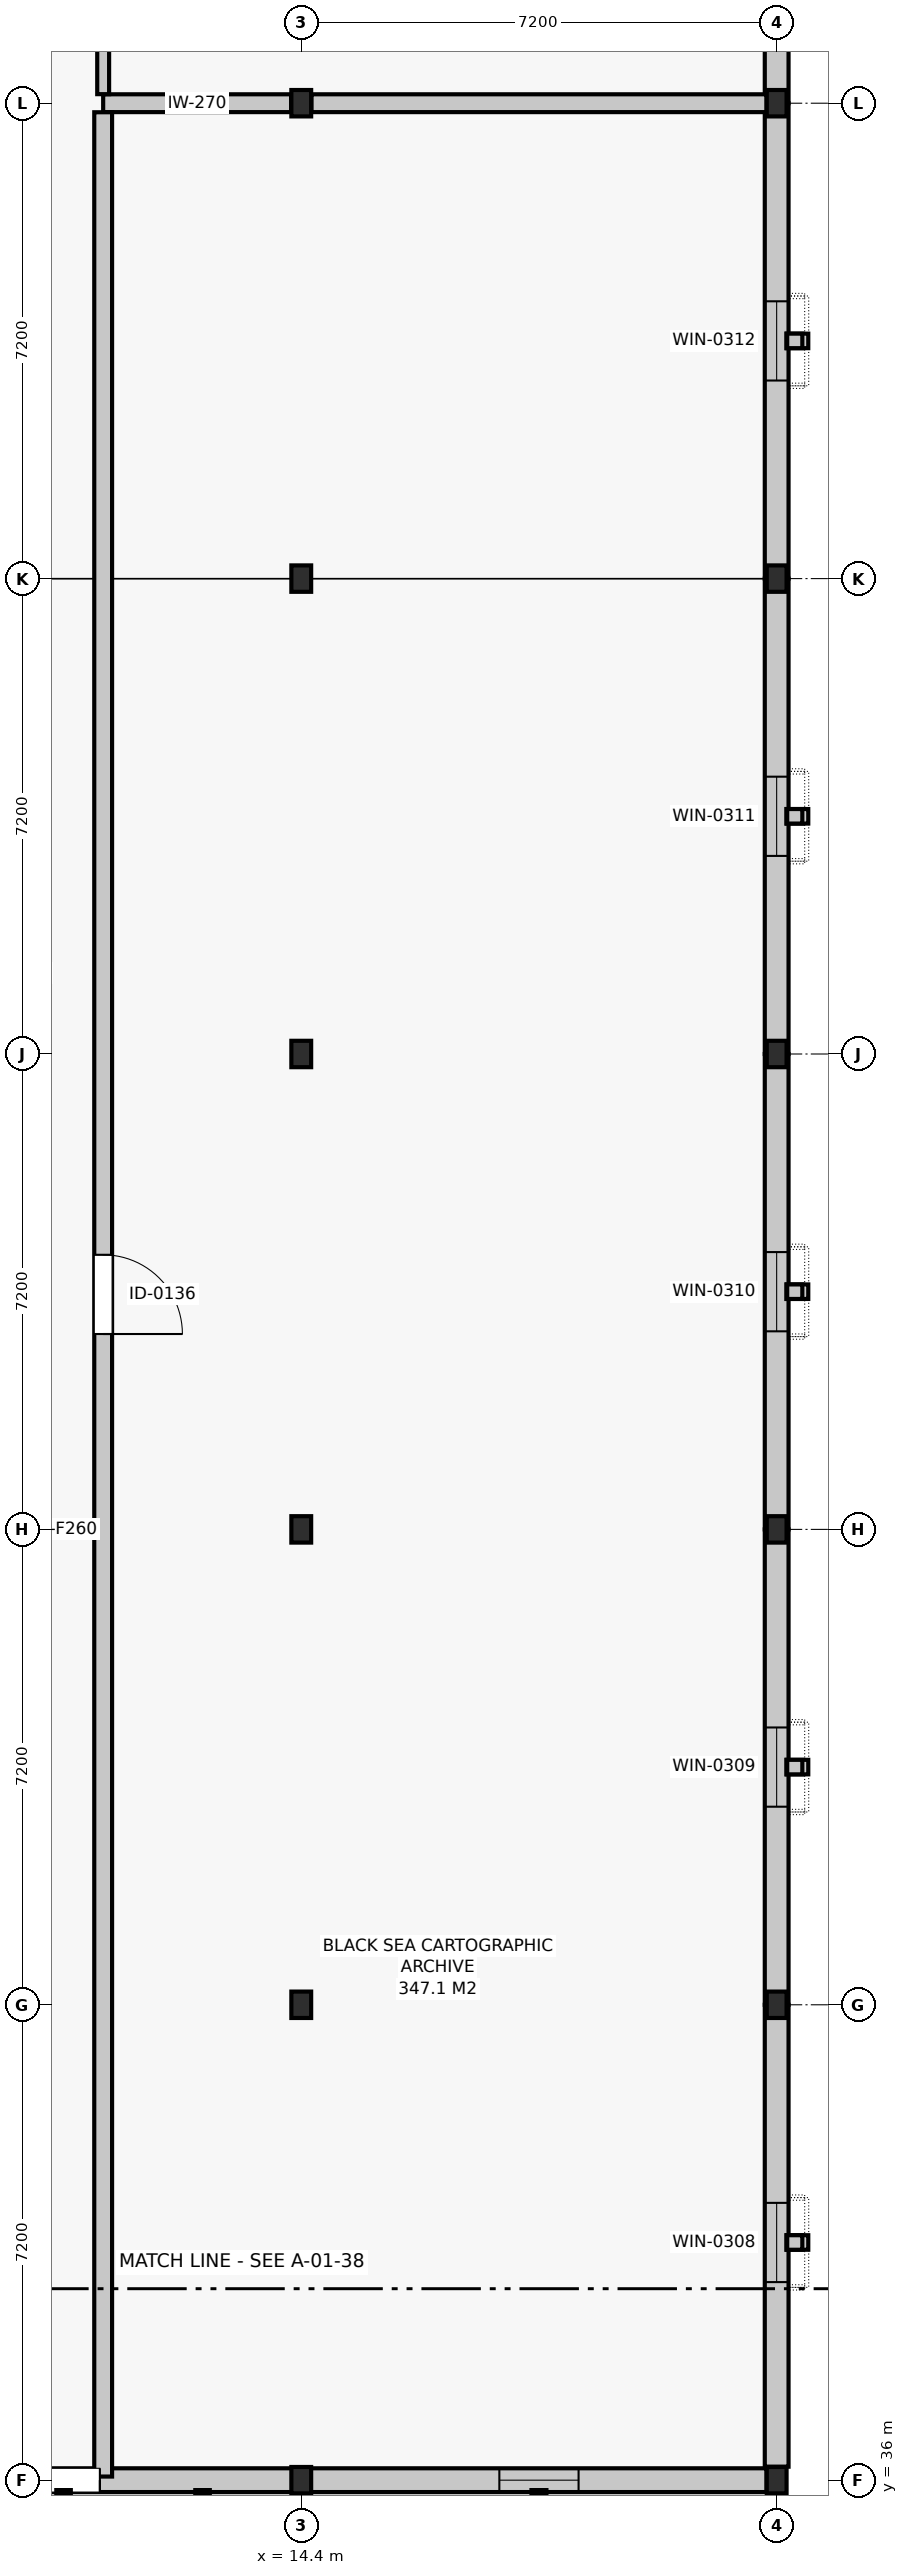
"""IFC4 building model, lengths in metres.
Left out: names, types, materials, properties, quantities, classifications, styles, units other than length and angle.
Written with IfcOpenShell. Run it as: python <this file> out.ifc"""

import sys

from ifc_helpers import new_model, si_unit, direction, frame, frame_2d, origin, origin_2d, place, context, subcontext, project, spatial, rectangle, i_section, extrude, element, fill, save


model = new_model("IFC4")
c1 = context("Model", 3, precision=1e-05, world=origin(), true_north=direction((0.0, 1.0)))
c2 = subcontext(c1, "Body", "Model", "MODEL_VIEW")
j1 = project(units=[si_unit("LENGTHUNIT", "METRE"), si_unit("PLANEANGLEUNIT", "RADIAN")], contexts=[c1])
p1 = place(None, origin())
s1 = spatial("IfcSite", under=j1, at=p1, CompositionType="ELEMENT")
p2 = place(p1, origin())
s2 = spatial("IfcBuilding", under=s1, at=p2, CompositionType="ELEMENT")
p3 = place(p2, frame((0.0, 0.0, 18.6)))
s3 = spatial("IfcBuildingStorey", under=s2, at=p3, CompositionType="ELEMENT", Elevation=18.6)
for number, where, z_axis, x_axis in (
    (1, (14.4, 36.0, 0.0), (0.0, 0.0, 1.0), (1.0, 0.0, 0.0)),
    (2, (14.4, 43.2, 0.0), (0.0, 0.0, 1.0), (1.0, 0.0, 0.0)),
    (3, (14.4, 50.4, 0.0), (0.0, 0.0, 1.0), (1.0, 0.0, 0.0)),
    (4, (14.4, 57.6, 0.0), (0.0, 0.0, 1.0), (1.0, 0.0, 0.0)),
    (5, (14.4, 64.8, 0.0), (0.0, 0.0, 1.0), (1.0, 0.0, 0.0)),
    (6, (14.4, 72.0, 0.0), (0.0, 0.0, 1.0), (1.0, 0.0, 0.0)),
    (7, (21.6, 36.0, 0.0), (0.0, 0.0, 1.0), (1.0, 0.0, 0.0)),
    (8, (21.6, 43.2, 0.0), (0.0, 0.0, 1.0), (1.0, 0.0, 0.0)),
    (9, (21.6, 50.4, 0.0), (0.0, 0.0, 1.0), (1.0, 0.0, 0.0)),
    (10, (21.6, 57.6, 0.0), (0.0, 0.0, 1.0), (1.0, 0.0, 0.0)),
    (11, (21.6, 64.8, 0.0), (0.0, 0.0, 1.0), (1.0, 0.0, 0.0)),
    (12, (21.6, 72.0, 0.0), (0.0, 0.0, 1.0), (1.0, 0.0, 0.0)),
):
    element("IfcColumn", number, at=place(p3, frame(where, z_axis=z_axis, x_axis=x_axis)), inside=s3, PredefinedType="COLUMN", context=c2, shape_type="SweptSolid", body=[
        extrude(i_section(OverallWidth=0.3, OverallDepth=0.4, WebThickness=0.013, FlangeThickness=0.024, FilletRadius=0.027, at=origin_2d()), origin(), (0.0, 0.0, 1.0), 4.2),
    ])
p4 = place(p3, frame((7.2, 36.0, 0.0), z_axis=(0.0, 0.0, 1.0), x_axis=(1.0, 0.0, 0.0)))
e13 = element("IfcWall", 13, at=p4, inside=s3, PredefinedType="SOLIDWALL", context=c2, shape_type="SweptSolid", body=[
    extrude(rectangle(XDim=7.2, YDim=0.36, at=frame_2d((3.6, 0.0))), origin(), (0.0, 0.0, 1.0), 3.22),
])
p5 = place(p4, frame((3.05, 0.0, 0.0)))
e14 = element("IfcOpeningElement", 14, at=p5, cuts=e13, PredefinedType="OPENING", context=c2, shape_type="SweptSolid", body=[
    extrude(rectangle(XDim=1.1, YDim=2.2, at=frame_2d((0.55, 1.1))), frame((0.0, 0.192, 0.0), z_axis=(0.0, -1.0, 0.0), x_axis=(1.0, 0.0, 0.0)), (0.0, 0.0, 1.0), 0.384),
])
p6 = place(p3, frame((14.4, 36.0, 0.0), z_axis=(0.0, 0.0, 1.0), x_axis=(1.0, 0.0, 0.0)))
e15 = element("IfcWall", 15, at=p6, inside=s3, PredefinedType="SOLIDWALL", context=c2, shape_type="SweptSolid", body=[
    extrude(rectangle(XDim=7.046, YDim=0.36, at=frame_2d((3.523, 0.0))), origin(), (0.0, 0.0, 1.0), 3.22),
])
p7 = place(p6, frame((3.0, 0.0, 0.95)))
e16 = element("IfcOpeningElement", 16, at=p7, cuts=e15, PredefinedType="OPENING", context=c2, shape_type="SweptSolid", body=[
    extrude(rectangle(XDim=1.2, YDim=2.15, at=frame_2d((0.6, 1.075))), frame((0.0, 0.192, 0.0), z_axis=(0.0, -1.0, 0.0), x_axis=(1.0, 0.0, 0.0)), (0.0, 0.0, 1.0), 0.384),
])
p8 = place(p3, frame((21.6, 36.204, 0.0), z_axis=(0.0, 0.0, 1.0), x_axis=(0.0, 1.0, 0.0)))
e17 = element("IfcWall", 17, at=p8, inside=s3, PredefinedType="SOLIDWALL", context=c2, shape_type="SweptSolid", body=[
    extrude(rectangle(XDim=6.996, YDim=0.36, at=frame_2d((3.498, 0.0))), origin(), (0.0, 0.0, 1.0), 3.22),
])
p9 = place(p8, frame((2.796, 0.0, 0.95)))
e18 = element("IfcOpeningElement", 18, at=p9, cuts=e17, PredefinedType="OPENING", context=c2, shape_type="SweptSolid", body=[
    extrude(rectangle(XDim=1.2, YDim=2.15, at=frame_2d((0.6, 1.075))), frame((0.0, 0.192, 0.0), z_axis=(0.0, -1.0, 0.0), x_axis=(1.0, 0.0, 0.0)), (0.0, 0.0, 1.0), 0.384),
])
p10 = place(p3, frame((21.6, 43.2, 0.0), z_axis=(0.0, 0.0, 1.0), x_axis=(0.0, 1.0, 0.0)))
e19 = element("IfcWall", 19, at=p10, inside=s3, PredefinedType="SOLIDWALL", context=c2, shape_type="SweptSolid", body=[
    extrude(rectangle(XDim=7.2, YDim=0.36, at=frame_2d((3.6, 0.0))), origin(), (0.0, 0.0, 1.0), 3.22),
])
p11 = place(p10, frame((3.0, 0.0, 0.95)))
e20 = element("IfcOpeningElement", 20, at=p11, cuts=e19, PredefinedType="OPENING", context=c2, shape_type="SweptSolid", body=[
    extrude(rectangle(XDim=1.2, YDim=2.15, at=frame_2d((0.6, 1.075))), frame((0.0, 0.192, 0.0), z_axis=(0.0, -1.0, 0.0), x_axis=(1.0, 0.0, 0.0)), (0.0, 0.0, 1.0), 0.384),
])
p12 = place(p3, frame((21.6, 50.4, 0.0), z_axis=(0.0, 0.0, 1.0), x_axis=(0.0, 1.0, 0.0)))
e21 = element("IfcWall", 21, at=p12, inside=s3, PredefinedType="SOLIDWALL", context=c2, shape_type="SweptSolid", body=[
    extrude(rectangle(XDim=7.2, YDim=0.36, at=frame_2d((3.6, 0.0))), origin(), (0.0, 0.0, 1.0), 3.22),
])
p13 = place(p12, frame((3.0, 0.0, 0.95)))
e22 = element("IfcOpeningElement", 22, at=p13, cuts=e21, PredefinedType="OPENING", context=c2, shape_type="SweptSolid", body=[
    extrude(rectangle(XDim=1.2, YDim=2.15, at=frame_2d((0.6, 1.075))), frame((0.0, 0.192, 0.0), z_axis=(0.0, -1.0, 0.0), x_axis=(1.0, 0.0, 0.0)), (0.0, 0.0, 1.0), 0.384),
])
p14 = place(p3, frame((21.6, 57.6, 0.0), z_axis=(0.0, 0.0, 1.0), x_axis=(0.0, 1.0, 0.0)))
e23 = element("IfcWall", 23, at=p14, inside=s3, PredefinedType="SOLIDWALL", context=c2, shape_type="SweptSolid", body=[
    extrude(rectangle(XDim=7.2, YDim=0.36, at=frame_2d((3.6, 0.0))), origin(), (0.0, 0.0, 1.0), 3.22),
])
p15 = place(p14, frame((3.0, 0.0, 0.95)))
e24 = element("IfcOpeningElement", 24, at=p15, cuts=e23, PredefinedType="OPENING", context=c2, shape_type="SweptSolid", body=[
    extrude(rectangle(XDim=1.2, YDim=2.15, at=frame_2d((0.6, 1.075))), frame((0.0, 0.192, 0.0), z_axis=(0.0, -1.0, 0.0), x_axis=(1.0, 0.0, 0.0)), (0.0, 0.0, 1.0), 0.384),
])
p16 = place(p3, frame((21.6, 64.8, 0.0), z_axis=(0.0, 0.0, 1.0), x_axis=(0.0, 1.0, 0.0)))
e25 = element("IfcWall", 25, at=p16, inside=s3, PredefinedType="SOLIDWALL", context=c2, shape_type="SweptSolid", body=[
    extrude(rectangle(XDim=7.2, YDim=0.36, at=frame_2d((3.6, 0.0))), origin(), (0.0, 0.0, 1.0), 3.22),
])
p17 = place(p16, frame((3.0, 0.0, 0.95)))
e26 = element("IfcOpeningElement", 26, at=p17, cuts=e25, PredefinedType="OPENING", context=c2, shape_type="SweptSolid", body=[
    extrude(rectangle(XDim=1.2, YDim=2.15, at=frame_2d((0.6, 1.075))), frame((0.0, 0.192, 0.0), z_axis=(0.0, -1.0, 0.0), x_axis=(1.0, 0.0, 0.0)), (0.0, 0.0, 1.0), 0.384),
])
p18 = place(p3, frame((21.6, 72.0, 0.0), z_axis=(0.0, 0.0, 1.0), x_axis=(0.0, 1.0, 0.0)))
e27 = element("IfcWall", 27, at=p18, inside=s3, PredefinedType="SOLIDWALL", context=c2, shape_type="SweptSolid", body=[
    extrude(rectangle(XDim=7.2, YDim=0.36, at=frame_2d((3.6, 0.0))), origin(), (0.0, 0.0, 1.0), 3.22),
])
p19 = place(p18, frame((3.0, 0.0, 0.95)))
e28 = element("IfcOpeningElement", 28, at=p19, cuts=e27, PredefinedType="OPENING", context=c2, shape_type="SweptSolid", body=[
    extrude(rectangle(XDim=1.2, YDim=2.15, at=frame_2d((0.6, 1.075))), frame((0.0, 0.192, 0.0), z_axis=(0.0, -1.0, 0.0), x_axis=(1.0, 0.0, 0.0)), (0.0, 0.0, 1.0), 0.384),
])
p20 = place(p3, frame((11.4, 72.0, 0.0), z_axis=(0.0, 0.0, 1.0), x_axis=(1.0, 0.0, 0.0)))
e29 = element("IfcWall", 29, at=p20, inside=s3, PredefinedType="SOLIDWALL", context=c2, shape_type="SweptSolid", body=[
    extrude(rectangle(XDim=2.846, YDim=0.27, at=frame_2d((1.423, 0.0))), origin(), (0.0, 0.0, 1.0), 3.375),
])
p21 = place(p3, frame((14.554, 72.0, 0.0), z_axis=(0.0, 0.0, 1.0), x_axis=(1.0, 0.0, 0.0)))
e30 = element("IfcWall", 30, at=p21, inside=s3, PredefinedType="SOLIDWALL", context=c2, shape_type="SweptSolid", body=[
    extrude(rectangle(XDim=6.892, YDim=0.27, at=frame_2d((3.446, 0.0))), origin(), (0.0, 0.0, 1.0), 3.375),
])
p22 = place(p3, frame((11.4, 36.055, 0.0), z_axis=(0.0, 0.0, 1.0), x_axis=(0.0, 1.0, 0.0)))
e31 = element("IfcWall", 31, at=p22, inside=s3, PredefinedType="SOLIDWALL", context=c2, shape_type="SweptSolid", body=[
    extrude(rectangle(XDim=35.808, YDim=0.27, at=frame_2d((17.904, 0.0))), origin(), (0.0, 0.0, 1.0), 3.245),
])
p23 = place(p22, frame((17.304, 0.0, 0.0)))
e32 = element("IfcOpeningElement", 32, at=p23, cuts=e31, PredefinedType="OPENING", context=c2, shape_type="SweptSolid", body=[
    extrude(rectangle(XDim=1.2, YDim=2.2, at=frame_2d((0.6, 1.1))), frame((0.0, 0.147, 0.0), z_axis=(0.0, -1.0, 0.0), x_axis=(1.0, 0.0, 0.0)), (0.0, 0.0, 1.0), 0.294),
])
p24 = place(p3, frame((11.4, 72.137, 0.0), z_axis=(0.0, 0.0, 1.0), x_axis=(0.0, 1.0, 0.0)))
e33 = element("IfcWall", 33, at=p24, inside=s3, PredefinedType="PARTITIONING", context=c2, shape_type="SweptSolid", body=[
    extrude(rectangle(XDim=24.171, YDim=0.18, at=frame_2d((12.085, 0.0))), origin(), (0.0, 0.0, 1.0), 3.375),
])
p25 = place(p24, frame((11.186, 0.0, 0.0)))
e34 = element("IfcOpeningElement", 34, at=p25, cuts=e33, PredefinedType="OPENING", context=c2, shape_type="SweptSolid", body=[
    extrude(rectangle(XDim=1.8, YDim=2.35, at=frame_2d((0.9, 1.175))), frame((0.0, 0.102, 0.0), z_axis=(0.0, -1.0, 0.0), x_axis=(1.0, 0.0, 0.0)), (0.0, 0.0, 1.0), 0.204),
])
p26 = place(p5, frame((1.1, 0.0, 0.0), z_axis=(0.0, 0.0, 1.0), x_axis=(-1.0, 0.0, 0.0)))
e35 = element("IfcDoor", 35, at=p26, inside=s3, OperationType="SINGLE_SWING_LEFT", PredefinedType="DOOR", context=c2, shape_type="SweptSolid", body=[
    extrude(rectangle(XDim=1.1, YDim=2.2, at=frame_2d((0.55, 1.1))), frame((0.0, 0.025, 0.0), z_axis=(0.0, -1.0, 0.0), x_axis=(1.0, 0.0, 0.0)), (0.0, 0.0, 1.0), 0.05),
])
fill(e14, e35)
p27 = place(p7, origin())
e36 = element("IfcWindow", 36, at=p27, inside=s3, PartitioningType="SINGLE_PANEL", PredefinedType="WINDOW", context=c2, shape_type="SweptSolid", body=[
    extrude(rectangle(XDim=1.2, YDim=2.15, at=frame_2d((0.6, 1.075))), frame((0.0, 0.03, 0.0), z_axis=(0.0, -1.0, 0.0), x_axis=(1.0, 0.0, 0.0)), (0.0, 0.0, 1.0), 0.06),
])
fill(e16, e36)
p28 = place(p9, origin())
e37 = element("IfcWindow", 37, at=p28, inside=s3, PartitioningType="SINGLE_PANEL", PredefinedType="WINDOW", context=c2, shape_type="SweptSolid", body=[
    extrude(rectangle(XDim=1.2, YDim=2.15, at=frame_2d((0.6, 1.075))), frame((0.0, 0.03, 0.0), z_axis=(0.0, -1.0, 0.0), x_axis=(1.0, 0.0, 0.0)), (0.0, 0.0, 1.0), 0.06),
])
fill(e18, e37)
p29 = place(p11, origin())
e38 = element("IfcWindow", 38, at=p29, inside=s3, PartitioningType="SINGLE_PANEL", PredefinedType="WINDOW", context=c2, shape_type="SweptSolid", body=[
    extrude(rectangle(XDim=1.2, YDim=2.15, at=frame_2d((0.6, 1.075))), frame((0.0, 0.03, 0.0), z_axis=(0.0, -1.0, 0.0), x_axis=(1.0, 0.0, 0.0)), (0.0, 0.0, 1.0), 0.06),
])
fill(e20, e38)
p30 = place(p13, origin())
e39 = element("IfcWindow", 39, at=p30, inside=s3, PartitioningType="SINGLE_PANEL", PredefinedType="WINDOW", context=c2, shape_type="SweptSolid", body=[
    extrude(rectangle(XDim=1.2, YDim=2.15, at=frame_2d((0.6, 1.075))), frame((0.0, 0.03, 0.0), z_axis=(0.0, -1.0, 0.0), x_axis=(1.0, 0.0, 0.0)), (0.0, 0.0, 1.0), 0.06),
])
fill(e22, e39)
p31 = place(p15, origin())
e40 = element("IfcWindow", 40, at=p31, inside=s3, PartitioningType="SINGLE_PANEL", PredefinedType="WINDOW", context=c2, shape_type="SweptSolid", body=[
    extrude(rectangle(XDim=1.2, YDim=2.15, at=frame_2d((0.6, 1.075))), frame((0.0, 0.03, 0.0), z_axis=(0.0, -1.0, 0.0), x_axis=(1.0, 0.0, 0.0)), (0.0, 0.0, 1.0), 0.06),
])
fill(e24, e40)
p32 = place(p17, origin())
e41 = element("IfcWindow", 41, at=p32, inside=s3, PartitioningType="SINGLE_PANEL", PredefinedType="WINDOW", context=c2, shape_type="SweptSolid", body=[
    extrude(rectangle(XDim=1.2, YDim=2.15, at=frame_2d((0.6, 1.075))), frame((0.0, 0.03, 0.0), z_axis=(0.0, -1.0, 0.0), x_axis=(1.0, 0.0, 0.0)), (0.0, 0.0, 1.0), 0.06),
])
fill(e26, e41)
p33 = place(p23, frame((1.2, 0.0, 0.0), z_axis=(0.0, 0.0, 1.0), x_axis=(-1.0, 0.0, 0.0)))
e42 = element("IfcDoor", 42, at=p33, inside=s3, OperationType="SINGLE_SWING_RIGHT", PredefinedType="DOOR", context=c2, shape_type="SweptSolid", body=[
    extrude(rectangle(XDim=1.2, YDim=2.2, at=frame_2d((0.6, 1.1))), frame((0.0, 0.025, 0.0), z_axis=(0.0, -1.0, 0.0), x_axis=(1.0, 0.0, 0.0)), (0.0, 0.0, 1.0), 0.05),
])
fill(e32, e42)
save(model, sys.argv[1])
